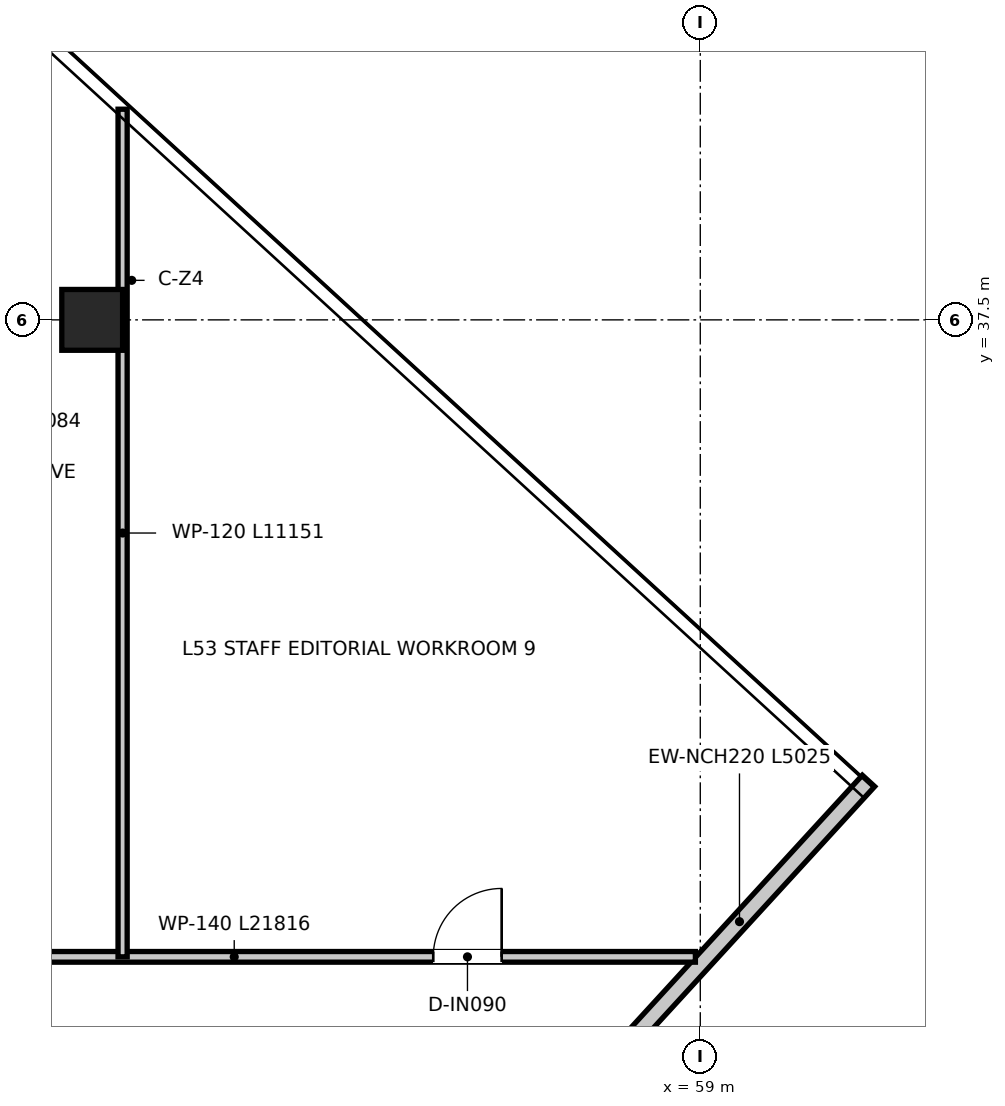
"""IFC4 building model, lengths in metres.
Left out: names, types, materials, properties, quantities, classifications, styles, units other than length and angle.
Written with IfcOpenShell. Run it as: python <this file> out.ifc"""

import sys

from ifc_helpers import new_model, si_unit, direction, frame, frame_2d, origin, origin_2d, place, context, subcontext, project, spatial, rectangle, extrude, source, transform, mapped, element, fill, save


model = new_model("IFC4")
c1 = context("Model", 3, precision=1e-05, world=origin(), true_north=direction((0.0, 1.0)))
c2 = subcontext(c1, "Body", "Model", "MODEL_VIEW")
j1 = project(units=[si_unit("LENGTHUNIT", "METRE"), si_unit("PLANEANGLEUNIT", "RADIAN")], contexts=[c1])
p1 = place(None, origin())
s1 = spatial("IfcSite", under=j1, at=p1, CompositionType="ELEMENT")
p2 = place(p1, origin())
s2 = spatial("IfcBuilding", under=s1, at=p2, CompositionType="ELEMENT")
p3 = place(p2, frame((0.0, 0.0, 219.15)))
s3 = spatial("IfcBuildingStorey", under=s2, at=p3, CompositionType="ELEMENT", Elevation=219.15)
m1 = source(origin(), c2, "Body", "SweptSolid", [
    extrude(rectangle(XDim=0.8, YDim=0.8, at=origin_2d()), origin(), (0.0, 0.0, 1.0), 3.95),
])
p4 = place(p3, frame((51.0, 37.5, 0.0), z_axis=(0.0, 0.0, 1.0), x_axis=(1.0, 0.0, 0.0)))
e1 = element("IfcColumn", 1, at=p4, inside=s3, PredefinedType="COLUMN", context=c2, shape_type="MappedRepresentation", body=[
    mapped(m1, transform((0.0, 0.0, 0.0), x_axis=(1.0, 0.0, 0.0), y_axis=(0.0, 1.0, 0.0), z_axis=(0.0, 0.0, 1.0), scale=1.0)),
])
p5 = place(p3, frame((57.818, 27.73, 0.0), z_axis=(0.0, 0.0, 1.0), x_axis=(0.675581609375, 0.737285215553, 0.0)))
e2 = element("IfcWall", 2, at=p5, inside=s3, PredefinedType="ELEMENTEDWALL", context=c2, shape_type="SweptSolid", body=[
    extrude(rectangle(XDim=5.025, YDim=0.22, at=frame_2d((2.512, 0.0))), origin(), (0.0, 0.0, 1.0), 3.67),
])
p6 = place(p3, frame((37.12, 29.12, 0.0), z_axis=(0.0, 0.0, 1.0), x_axis=(1.0, 0.0, 0.0)))
e3 = element("IfcWall", 3, at=p6, inside=s3, PredefinedType="PARTITIONING", context=c2, shape_type="SweptSolid", body=[
    extrude(rectangle(XDim=21.815, YDim=0.14, at=frame_2d((10.908, 0.0))), origin(), (0.0, 0.0, 1.0), 3.03),
])
p7 = place(p6, frame((3.03, 0.0, 0.0)))
e4 = element("IfcOpeningElement", 4, at=p7, cuts=e3, PredefinedType="OPENING", context=c2, shape_type="SweptSolid", body=[
    extrude(rectangle(XDim=0.9, YDim=2.1, at=frame_2d((0.45, 1.05))), frame((0.0, 0.08, 0.0), z_axis=(0.0, -1.0, 0.0), x_axis=(1.0, 0.0, 0.0)), (0.0, 0.0, 1.0), 0.16),
])
p8 = place(p6, frame((8.52, 0.0, 0.0)))
e5 = element("IfcOpeningElement", 5, at=p8, cuts=e3, PredefinedType="OPENING", context=c2, shape_type="SweptSolid", body=[
    extrude(rectangle(XDim=0.9, YDim=2.1, at=frame_2d((0.45, 1.05))), frame((0.0, 0.08, 0.0), z_axis=(0.0, -1.0, 0.0), x_axis=(1.0, 0.0, 0.0)), (0.0, 0.0, 1.0), 0.16),
])
p9 = place(p6, frame((12.23, 0.0, 0.0)))
e6 = element("IfcOpeningElement", 6, at=p9, cuts=e3, PredefinedType="OPENING", context=c2, shape_type="SweptSolid", body=[
    extrude(rectangle(XDim=0.9, YDim=2.1, at=frame_2d((0.45, 1.05))), frame((0.0, 0.08, 0.0), z_axis=(0.0, -1.0, 0.0), x_axis=(1.0, 0.0, 0.0)), (0.0, 0.0, 1.0), 0.16),
])
p10 = place(p6, frame((18.367, 0.0, 0.0)))
e7 = element("IfcOpeningElement", 7, at=p10, cuts=e3, PredefinedType="OPENING", context=c2, shape_type="SweptSolid", body=[
    extrude(rectangle(XDim=0.9, YDim=2.1, at=frame_2d((0.45, 1.05))), frame((0.0, 0.08, 0.0), z_axis=(0.0, -1.0, 0.0), x_axis=(1.0, 0.0, 0.0)), (0.0, 0.0, 1.0), 0.16),
])
p11 = place(p3, frame((51.4, 29.12, 0.0), z_axis=(0.0, 0.0, 1.0), x_axis=(0.0, 1.0, 0.0)))
e8 = element("IfcWall", 8, at=p11, inside=s3, PredefinedType="PARTITIONING", context=c2, shape_type="SweptSolid", body=[
    extrude(rectangle(XDim=11.151, YDim=0.12, at=frame_2d((5.576, 0.0))), origin(), (0.0, 0.0, 1.0), 3.67),
])
p12 = place(p10, origin())
e9 = element("IfcDoor", 9, at=p12, inside=s3, OperationType="SINGLE_SWING_RIGHT", PredefinedType="DOOR", context=c2, shape_type="SweptSolid", body=[
    extrude(rectangle(XDim=0.9, YDim=2.1, at=frame_2d((0.45, 1.05))), frame((0.0, 0.025, 0.0), z_axis=(0.0, -1.0, 0.0), x_axis=(1.0, 0.0, 0.0)), (0.0, 0.0, 1.0), 0.05),
])
fill(e7, e9)
save(model, sys.argv[1])
